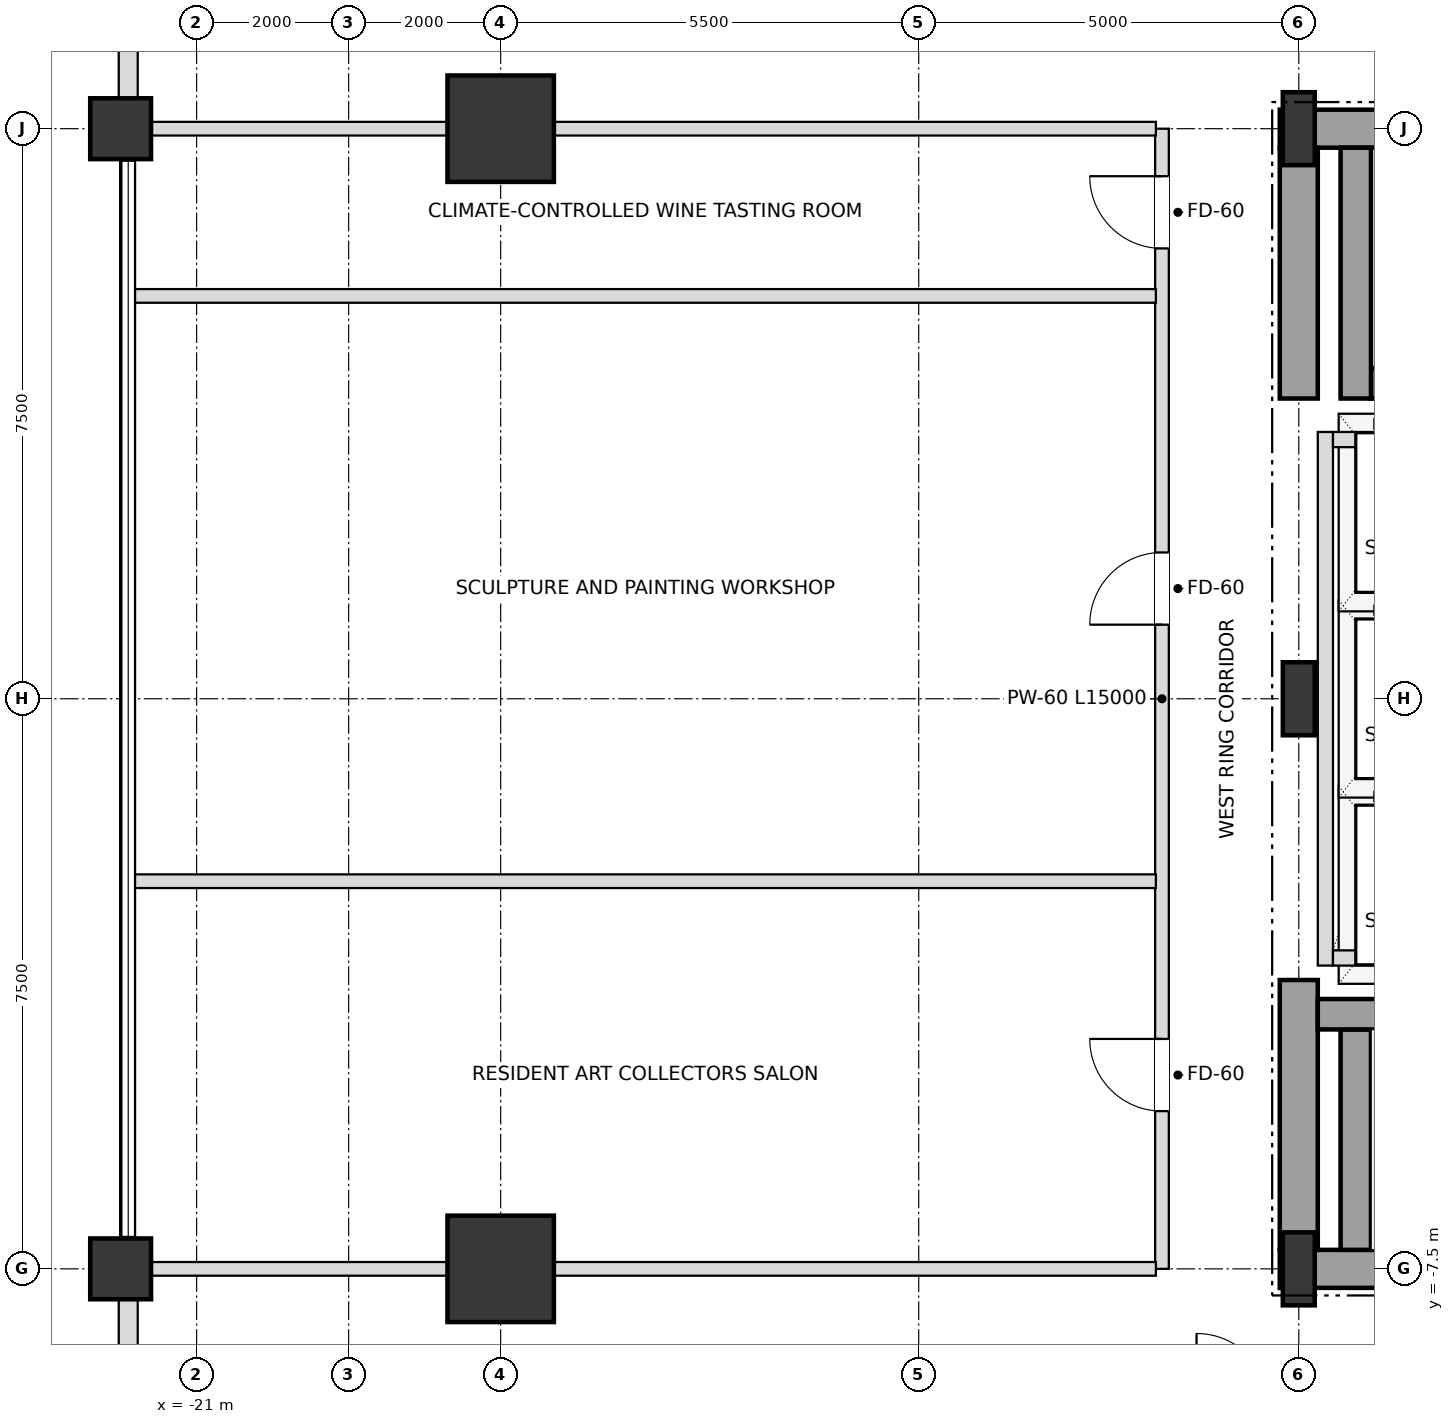
"""IFC4 building model, lengths in metres.
Left out: names, types, materials, properties, quantities, classifications, styles, units other than length and angle.
Written with IfcOpenShell. Run it as: python <this file> out.ifc"""

import sys

from ifc_helpers import new_model, si_unit, direction, frame, frame_2d, origin, origin_2d, place, context, subcontext, project, spatial, rectangle, i_section, extrude, element, fill, save


model = new_model("IFC4")
c1 = context("Model", 3, precision=1e-05, world=origin(), true_north=direction((0.0, 1.0)))
c2 = subcontext(c1, "Body", "Model", "MODEL_VIEW")
j1 = project(units=[si_unit("LENGTHUNIT", "METRE"), si_unit("PLANEANGLEUNIT", "RADIAN")], contexts=[c1])
p1 = place(None, origin())
s1 = spatial("IfcSite", under=j1, at=p1, CompositionType="ELEMENT")
p2 = place(p1, origin())
s2 = spatial("IfcBuilding", under=s1, at=p2, CompositionType="ELEMENT")
p3 = place(p2, frame((0.0, 0.0, 79.2)))
s3 = spatial("IfcBuildingStorey", under=s2, at=p3, CompositionType="ELEMENT", Elevation=79.2)
for number, where, z_axis, x_axis in (
    (1, (-6.5, -7.5, 0.0), (0.0, 0.0, 1.0), (1.0, 0.0, 0.0)),
    (2, (-6.5, 0.0, 0.0), (0.0, 0.0, 1.0), (1.0, 0.0, 0.0)),
    (3, (-6.5, 7.5, 0.0), (0.0, 0.0, 1.0), (1.0, 0.0, 0.0)),
):
    element("IfcColumn", number, at=place(p3, frame(where, z_axis=z_axis, x_axis=x_axis)), inside=s3, PredefinedType="COLUMN", context=c2, shape_type="SweptSolid", body=[
        extrude(i_section(OverallWidth=0.42, OverallDepth=0.96, WebThickness=0.022, FlangeThickness=0.034, at=origin_2d()), origin(), (0.0, 0.0, 1.0), 3.6),
    ])
for number, where, z_axis, x_axis in (
    (4, (-17.0, 7.5, 0.0), (0.0, 0.0, 1.0), (1.0, 0.0, 0.0)),
    (5, (-17.0, -7.5, 0.0), (0.0, 0.0, 1.0), (1.0, 0.0, 0.0)),
):
    element("IfcColumn", number, at=place(p3, frame(where, z_axis=z_axis, x_axis=x_axis)), inside=s3, PredefinedType="USERDEFINED", context=c2, shape_type="SweptSolid", body=[
        extrude(rectangle(XDim=1.4, YDim=1.4, at=origin_2d()), origin(), (0.0, 0.0, 1.0), 3.6),
    ])
for number, where, z_axis, x_axis in (
    (6, (-22.0, -7.5, 0.0), (0.0, 0.0, 1.0), (1.0, 0.0, 0.0)),
    (7, (-22.0, 7.5, 0.0), (0.0, 0.0, 1.0), (1.0, 0.0, 0.0)),
):
    element("IfcColumn", number, at=place(p3, frame(where, z_axis=z_axis, x_axis=x_axis)), inside=s3, PredefinedType="COLUMN", context=c2, shape_type="SweptSolid", body=[
        extrude(rectangle(XDim=0.8, YDim=0.8, at=origin_2d()), origin(), (0.0, 0.0, 1.0), 3.6),
    ])
p4 = place(p3, frame((-21.9, 12.605, 0.0), z_axis=(0.0, 0.0, 1.0), x_axis=(0.0, -1.0, 0.0)))
e8 = element("IfcWall", 8, at=p4, inside=s3, PredefinedType="SOLIDWALL", context=c2, shape_type="SweptSolid", body=[
    extrude(rectangle(XDim=4.71, YDim=0.25, at=frame_2d((2.355, 0.0))), origin(), (0.0, 0.0, 1.0), 2.736),
])
p5 = place(p4, frame((1.455, 0.0, 0.72)))
e9 = element("IfcOpeningElement", 9, at=p5, cuts=e8, PredefinedType="OPENING", context=c2, shape_type="SweptSolid", body=[
    extrude(rectangle(XDim=1.8, YDim=1.68, at=frame_2d((0.9, 0.84))), frame((0.0, 0.135, 0.0), z_axis=(0.0, -1.0, 0.0), x_axis=(1.0, 0.0, 0.0)), (0.0, 0.0, 1.0), 0.27),
])
p6 = place(p3, frame((-21.9, -7.895, 0.0), z_axis=(0.0, 0.0, 1.0), x_axis=(0.0, -1.0, 0.0)))
e10 = element("IfcWall", 10, at=p6, inside=s3, PredefinedType="SOLIDWALL", context=c2, shape_type="SweptSolid", body=[
    extrude(rectangle(XDim=4.71, YDim=0.25, at=frame_2d((2.355, 0.0))), origin(), (0.0, 0.0, 1.0), 2.736),
])
p7 = place(p6, frame((1.455, 0.0, 0.72)))
e11 = element("IfcOpeningElement", 11, at=p7, cuts=e10, PredefinedType="OPENING", context=c2, shape_type="SweptSolid", body=[
    extrude(rectangle(XDim=1.8, YDim=1.68, at=frame_2d((0.9, 0.84))), frame((0.0, 0.135, 0.0), z_axis=(0.0, -1.0, 0.0), x_axis=(1.0, 0.0, 0.0)), (0.0, 0.0, 1.0), 0.27),
])
p8 = place(p3, frame((-6.75, -7.5, 0.0), z_axis=(0.0, 0.0, 1.0), x_axis=(1.0, 0.0, 0.0)))
e12 = element("IfcWall", 12, at=p8, inside=s3, PredefinedType="SHEAR", context=c2, shape_type="SweptSolid", body=[
    extrude(rectangle(XDim=6.75, YDim=0.5, at=frame_2d((3.375, 0.0))), origin(), (0.0, 0.0, 1.0), 3.38),
])
p9 = place(p3, frame((-6.75, 7.5, 0.0), z_axis=(0.0, 0.0, 1.0), x_axis=(1.0, 0.0, 0.0)))
e13 = element("IfcWall", 13, at=p9, inside=s3, PredefinedType="SHEAR", context=c2, shape_type="SweptSolid", body=[
    extrude(rectangle(XDim=6.75, YDim=0.5, at=frame_2d((3.375, 0.0))), origin(), (0.0, 0.0, 1.0), 3.38),
])
p10 = place(p9, frame((1.65, 0.0, 0.0)))
e14 = element("IfcOpeningElement", 14, at=p10, cuts=e13, PredefinedType="OPENING", context=c2, shape_type="SweptSolid", body=[
    extrude(rectangle(XDim=1.05, YDim=2.15, at=frame_2d((0.525, 1.075))), frame((0.0, 0.26, 0.0), z_axis=(0.0, -1.0, 0.0), x_axis=(1.0, 0.0, 0.0)), (0.0, 0.0, 1.0), 0.52),
])
p11 = place(p3, frame((-6.5, -7.25, 0.0), z_axis=(0.0, 0.0, 1.0), x_axis=(0.0, 1.0, 0.0)))
e15 = element("IfcWall", 15, at=p11, inside=s3, PredefinedType="SHEAR", context=c2, shape_type="SweptSolid", body=[
    extrude(rectangle(XDim=3.55, YDim=0.5, at=frame_2d((1.775, 0.0))), origin(), (0.0, 0.0, 1.0), 3.38),
])
p12 = place(p3, frame((-6.5, 3.95, 0.0), z_axis=(0.0, 0.0, 1.0), x_axis=(0.0, 1.0, 0.0)))
e16 = element("IfcWall", 16, at=p12, inside=s3, PredefinedType="SHEAR", context=c2, shape_type="SweptSolid", body=[
    extrude(rectangle(XDim=3.3, YDim=0.5, at=frame_2d((1.65, 0.0))), origin(), (0.0, 0.0, 1.0), 3.38),
])
p13 = place(p3, frame((-5.75, -7.25, 0.0), z_axis=(0.0, 0.0, 1.0), x_axis=(0.0, 1.0, 0.0)))
e17 = element("IfcWall", 17, at=p13, inside=s3, PredefinedType="SHEAR", context=c2, shape_type="SweptSolid", body=[
    extrude(rectangle(XDim=2.9, YDim=0.4, at=frame_2d((1.45, 0.0))), origin(), (0.0, 0.0, 1.0), 3.38),
])
p14 = place(p3, frame((-6.25, -4.15, 0.0), z_axis=(0.0, 0.0, 1.0), x_axis=(1.0, 0.0, 0.0)))
e18 = element("IfcWall", 18, at=p14, inside=s3, PredefinedType="SHEAR", context=c2, shape_type="SweptSolid", body=[
    extrude(rectangle(XDim=7.78, YDim=0.4, at=frame_2d((3.89, 0.0))), origin(), (0.0, 0.0, 1.0), 3.38),
])
p15 = place(p3, frame((-5.55, 4.15, 0.0), z_axis=(0.0, 0.0, 1.0), x_axis=(1.0, 0.0, 0.0)))
e19 = element("IfcWall", 19, at=p15, inside=s3, PredefinedType="SHEAR", context=c2, shape_type="SweptSolid", body=[
    extrude(rectangle(XDim=7.08, YDim=0.4, at=frame_2d((3.54, 0.0))), origin(), (0.0, 0.0, 1.0), 3.38),
])
p16 = place(p3, frame((-5.75, 3.95, 0.0), z_axis=(0.0, 0.0, 1.0), x_axis=(0.0, 1.0, 0.0)))
e20 = element("IfcWall", 20, at=p16, inside=s3, PredefinedType="SHEAR", context=c2, shape_type="SweptSolid", body=[
    extrude(rectangle(XDim=3.3, YDim=0.4, at=frame_2d((1.65, 0.0))), origin(), (0.0, 0.0, 1.0), 3.38),
])
p17 = place(p3, frame((-6.15, -3.51, 0.0), z_axis=(0.0, 0.0, 1.0), x_axis=(0.0, 1.0, 0.0)))
e21 = element("IfcWall", 21, at=p17, inside=s3, PredefinedType="SOLIDWALL", context=c2, shape_type="SweptSolid", body=[
    extrude(rectangle(XDim=7.02, YDim=0.2, at=frame_2d((3.51, 0.0))), origin(), (0.0, 0.0, 1.0), 3.38),
])
for number, where, z_axis, x_axis in (
    (22, (-6.05, -3.41, 0.0), (0.0, 0.0, 1.0), (1.0, 0.0, 0.0)),
    (23, (-6.05, 3.41, 0.0), (0.0, 0.0, 1.0), (1.0, 0.0, 0.0)),
):
    element("IfcWall", number, at=place(p3, frame(where, z_axis=z_axis, x_axis=x_axis)), inside=s3, PredefinedType="SOLIDWALL", context=c2, shape_type="SweptSolid", body=[
        extrude(rectangle(XDim=2.2, YDim=0.2, at=frame_2d((1.1, 0.0))), origin(), (0.0, 0.0, 1.0), 3.38),
    ])
p18 = place(p3, frame((-8.3, -7.5, 0.0), z_axis=(0.0, 0.0, 1.0), x_axis=(0.0, 1.0, 0.0)))
e24 = element("IfcWall", 24, at=p18, inside=s3, PredefinedType="PARTITIONING", context=c2, shape_type="SweptSolid", body=[
    extrude(rectangle(XDim=15.0, YDim=0.18, at=frame_2d((7.5, 0.0))), origin(), (0.0, 0.0, 1.0), 3.38),
])
p19 = place(p18, frame((2.075, 0.0, 0.0)))
e25 = element("IfcOpeningElement", 25, at=p19, cuts=e24, PredefinedType="OPENING", context=c2, shape_type="SweptSolid", body=[
    extrude(rectangle(XDim=0.95, YDim=2.15, at=frame_2d((0.475, 1.075))), frame((0.0, 0.1, 0.0), z_axis=(0.0, -1.0, 0.0), x_axis=(1.0, 0.0, 0.0)), (0.0, 0.0, 1.0), 0.2),
])
p20 = place(p18, frame((8.475, 0.0, 0.0)))
e26 = element("IfcOpeningElement", 26, at=p20, cuts=e24, PredefinedType="OPENING", context=c2, shape_type="SweptSolid", body=[
    extrude(rectangle(XDim=0.95, YDim=2.15, at=frame_2d((0.475, 1.075))), frame((0.0, 0.1, 0.0), z_axis=(0.0, -1.0, 0.0), x_axis=(1.0, 0.0, 0.0)), (0.0, 0.0, 1.0), 0.2),
])
p21 = place(p18, frame((13.425, 0.0, 0.0)))
e27 = element("IfcOpeningElement", 27, at=p21, cuts=e24, PredefinedType="OPENING", context=c2, shape_type="SweptSolid", body=[
    extrude(rectangle(XDim=0.95, YDim=2.15, at=frame_2d((0.475, 1.075))), frame((0.0, 0.1, 0.0), z_axis=(0.0, -1.0, 0.0), x_axis=(1.0, 0.0, 0.0)), (0.0, 0.0, 1.0), 0.2),
])
p22 = place(p3, frame((-21.9, -7.5, 0.0), z_axis=(0.0, 0.0, 1.0), x_axis=(1.0, 0.0, 0.0)))
e28 = element("IfcWall", 28, at=p22, inside=s3, PredefinedType="PARTITIONING", context=c2, shape_type="SweptSolid", body=[
    extrude(rectangle(XDim=13.52, YDim=0.18, at=frame_2d((6.76, 0.0))), origin(), (0.0, 0.0, 1.0), 2.816),
])
for number, where, z_axis, x_axis in (
    (29, (-21.82, -2.4, 0.0), (0.0, 0.0, 1.0), (1.0, 0.0, 0.0)),
    (30, (-21.82, 5.3, 0.0), (0.0, 0.0, 1.0), (1.0, 0.0, 0.0)),
):
    element("IfcWall", number, at=place(p3, frame(where, z_axis=z_axis, x_axis=x_axis)), inside=s3, PredefinedType="PARTITIONING", context=c2, shape_type="SweptSolid", body=[
        extrude(rectangle(XDim=13.44, YDim=0.18, at=frame_2d((6.72, 0.0))), origin(), (0.0, 0.0, 1.0), 2.816),
    ])
p23 = place(p3, frame((-21.9, 7.5, 0.0), z_axis=(0.0, 0.0, 1.0), x_axis=(1.0, 0.0, 0.0)))
e31 = element("IfcWall", 31, at=p23, inside=s3, PredefinedType="PARTITIONING", context=c2, shape_type="SweptSolid", body=[
    extrude(rectangle(XDim=13.52, YDim=0.18, at=frame_2d((6.76, 0.0))), origin(), (0.0, 0.0, 1.0), 2.816),
])
p24 = place(p19, origin())
e32 = element("IfcDoor", 32, at=p24, inside=s3, OperationType="SINGLE_SWING_RIGHT", PredefinedType="DOOR", context=c2, shape_type="SweptSolid", body=[
    extrude(rectangle(XDim=0.95, YDim=2.15, at=frame_2d((0.475, 1.075))), frame((0.0, 0.025, 0.0), z_axis=(0.0, -1.0, 0.0), x_axis=(1.0, 0.0, 0.0)), (0.0, 0.0, 1.0), 0.05),
])
fill(e25, e32)
p25 = place(p20, origin())
e33 = element("IfcDoor", 33, at=p25, inside=s3, OperationType="SINGLE_SWING_LEFT", PredefinedType="DOOR", context=c2, shape_type="SweptSolid", body=[
    extrude(rectangle(XDim=0.95, YDim=2.15, at=frame_2d((0.475, 1.075))), frame((0.0, 0.025, 0.0), z_axis=(0.0, -1.0, 0.0), x_axis=(1.0, 0.0, 0.0)), (0.0, 0.0, 1.0), 0.05),
])
fill(e26, e33)
p26 = place(p21, origin())
e34 = element("IfcDoor", 34, at=p26, inside=s3, OperationType="SINGLE_SWING_RIGHT", PredefinedType="DOOR", context=c2, shape_type="SweptSolid", body=[
    extrude(rectangle(XDim=0.95, YDim=2.15, at=frame_2d((0.475, 1.075))), frame((0.0, 0.025, 0.0), z_axis=(0.0, -1.0, 0.0), x_axis=(1.0, 0.0, 0.0)), (0.0, 0.0, 1.0), 0.05),
])
fill(e27, e34)
save(model, sys.argv[1])
